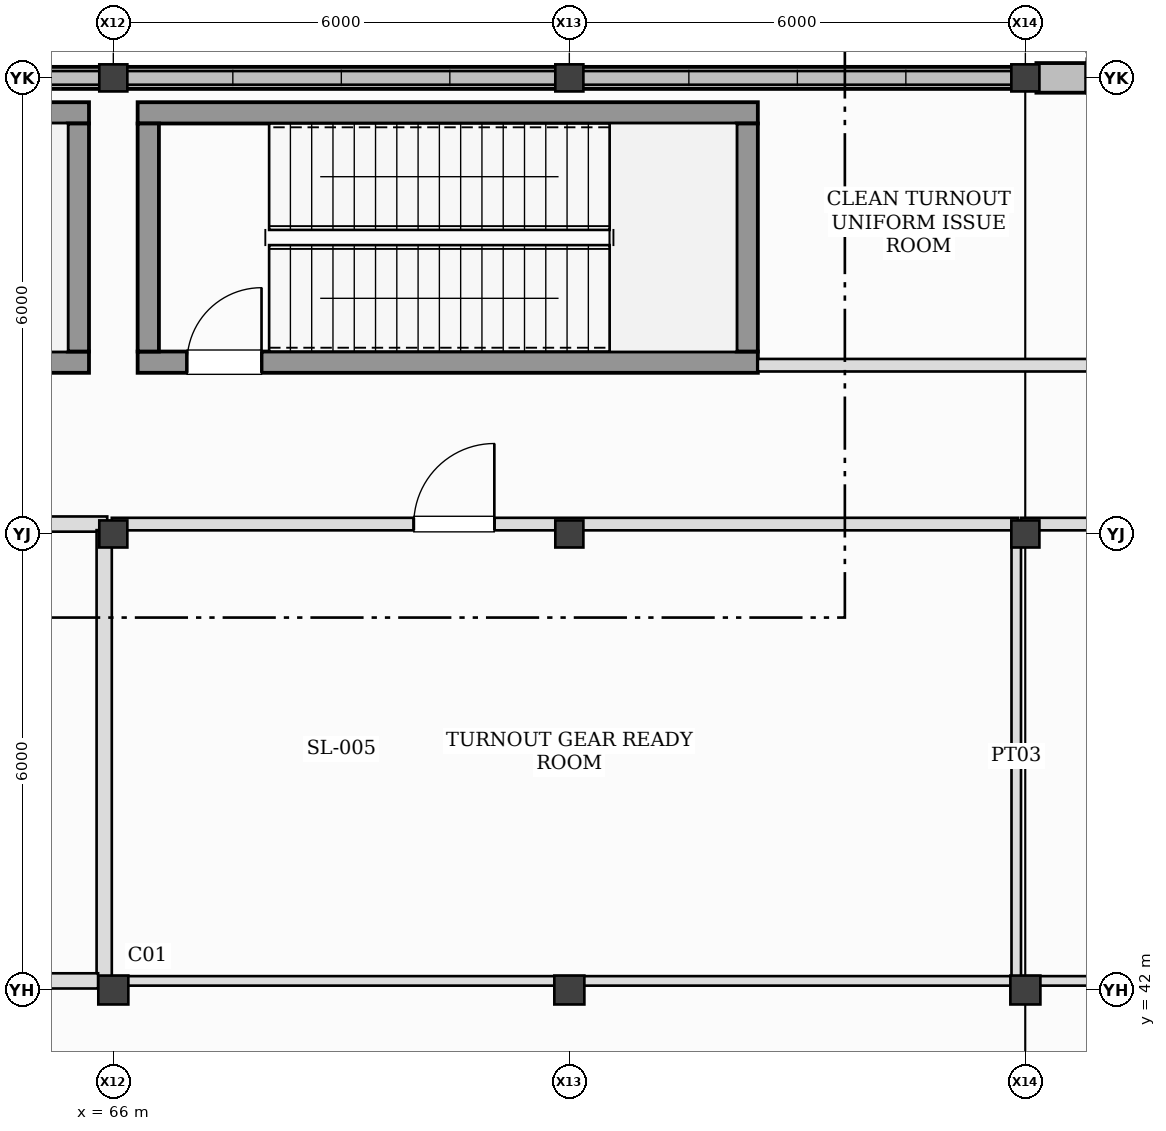
"""IFC4 building model, lengths in metres.
Left out: names, types, materials, properties, quantities, classifications, styles, units other than length and angle.
Written with IfcOpenShell. Run it as: python <this file> out.ifc"""

import sys

from ifc_helpers import new_model, si_unit, direction, frame, frame_2d, origin, origin_2d, place, context, subcontext, project, spatial, rectangle, i_section, extrude, element, fill, save


model = new_model("IFC4")
c1 = context("Model", 3, precision=1e-05, world=origin(), true_north=direction((0.0, 1.0)))
c2 = subcontext(c1, "Body", "Model", "MODEL_VIEW")
j1 = project(units=[si_unit("LENGTHUNIT", "METRE"), si_unit("PLANEANGLEUNIT", "RADIAN")], contexts=[c1])
p1 = place(None, origin())
s1 = spatial("IfcSite", under=j1, at=p1, CompositionType="ELEMENT")
p2 = place(p1, origin())
s2 = spatial("IfcBuilding", under=s1, at=p2, CompositionType="ELEMENT")
p3 = place(p2, origin())
s3 = spatial("IfcBuildingStorey", under=s2, at=p3, CompositionType="ELEMENT", Elevation=0.0)
p4 = place(p3, frame((66.0, 42.0, -0.41), z_axis=(0.0, 0.0, 1.0), x_axis=(1.0, 0.0, 0.0)))
e1 = element("IfcColumn", 1, at=p4, inside=s3, PredefinedType="COLUMN", context=c2, shape_type="SweptSolid", body=[
    extrude(i_section(OverallWidth=0.395, OverallDepth=0.38, WebThickness=0.019, FlangeThickness=0.03, at=origin_2d()), origin(), (0.0, 0.0, 1.0), 6.41),
])
for number, where, z_axis, x_axis in (
    (2, (66.0, 48.0, -0.41), (0.0, 0.0, 1.0), (1.0, 0.0, 0.0)),
    (3, (66.0, 54.0, -0.41), (0.0, 0.0, 1.0), (1.0, 0.0, 0.0)),
):
    element("IfcColumn", number, at=place(p3, frame(where, z_axis=z_axis, x_axis=x_axis)), inside=s3, PredefinedType="COLUMN", context=c2, shape_type="SweptSolid", body=[
        extrude(i_section(OverallWidth=0.369, OverallDepth=0.356, WebThickness=0.011, FlangeThickness=0.018, at=origin_2d()), origin(), (0.0, 0.0, 1.0), 6.41),
    ])
p5 = place(p3, frame((72.0, 42.0, -0.41), z_axis=(0.0, 0.0, 1.0), x_axis=(1.0, 0.0, 0.0)))
e4 = element("IfcColumn", 4, at=p5, inside=s3, PredefinedType="COLUMN", context=c2, shape_type="SweptSolid", body=[
    extrude(i_section(OverallWidth=0.395, OverallDepth=0.38, WebThickness=0.019, FlangeThickness=0.03, at=origin_2d()), origin(), (0.0, 0.0, 1.0), 6.41),
])
for number, where, z_axis, x_axis in (
    (5, (72.0, 48.0, -0.41), (0.0, 0.0, 1.0), (1.0, 0.0, 0.0)),
    (6, (72.0, 54.0, -0.41), (0.0, 0.0, 1.0), (1.0, 0.0, 0.0)),
):
    element("IfcColumn", number, at=place(p3, frame(where, z_axis=z_axis, x_axis=x_axis)), inside=s3, PredefinedType="COLUMN", context=c2, shape_type="SweptSolid", body=[
        extrude(i_section(OverallWidth=0.369, OverallDepth=0.356, WebThickness=0.011, FlangeThickness=0.018, at=origin_2d()), origin(), (0.0, 0.0, 1.0), 6.41),
    ])
p6 = place(p3, frame((78.0, 42.0, -0.41), z_axis=(0.0, 0.0, 1.0), x_axis=(1.0, 0.0, 0.0)))
e7 = element("IfcColumn", 7, at=p6, inside=s3, PredefinedType="COLUMN", context=c2, shape_type="SweptSolid", body=[
    extrude(i_section(OverallWidth=0.395, OverallDepth=0.38, WebThickness=0.019, FlangeThickness=0.03, at=origin_2d()), origin(), (0.0, 0.0, 1.0), 6.41),
])
for number, where, z_axis, x_axis in (
    (8, (78.0, 48.0, -0.41), (0.0, 0.0, 1.0), (1.0, 0.0, 0.0)),
    (9, (78.0, 54.0, -0.41), (0.0, 0.0, 1.0), (1.0, 0.0, 0.0)),
):
    element("IfcColumn", number, at=place(p3, frame(where, z_axis=z_axis, x_axis=x_axis)), inside=s3, PredefinedType="COLUMN", context=c2, shape_type="SweptSolid", body=[
        extrude(i_section(OverallWidth=0.369, OverallDepth=0.356, WebThickness=0.011, FlangeThickness=0.018, at=origin_2d()), origin(), (0.0, 0.0, 1.0), 6.41),
    ])
p7 = place(p3, frame((65.855, 54.0, 0.0), z_axis=(0.0, 0.0, 1.0), x_axis=(-1.0, 0.0, 0.0)))
e10 = element("IfcWall", 10, at=p7, inside=s3, PredefinedType="STANDARD", context=c2, shape_type="SweptSolid", body=[
    extrude(rectangle(XDim=5.71, YDim=0.29, at=frame_2d((2.855, 0.0))), origin(), (0.0, 0.0, 1.0), 0.92),
])
p8 = place(p3, frame((71.855, 54.0, 0.0), z_axis=(0.0, 0.0, 1.0), x_axis=(-1.0, 0.0, 0.0)))
e11 = element("IfcWall", 11, at=p8, inside=s3, PredefinedType="STANDARD", context=c2, shape_type="SweptSolid", body=[
    extrude(rectangle(XDim=5.71, YDim=0.29, at=frame_2d((2.855, 0.0))), origin(), (0.0, 0.0, 1.0), 0.32),
])
p9 = place(p3, frame((77.855, 54.0, 0.0), z_axis=(0.0, 0.0, 1.0), x_axis=(-1.0, 0.0, 0.0)))
e12 = element("IfcWall", 12, at=p9, inside=s3, PredefinedType="STANDARD", context=c2, shape_type="SweptSolid", body=[
    extrude(rectangle(XDim=5.71, YDim=0.29, at=frame_2d((2.855, 0.0))), origin(), (0.0, 0.0, 1.0), 0.44),
])
p10 = place(p3, frame((83.855, 54.0, 0.0), z_axis=(0.0, 0.0, 1.0), x_axis=(-1.0, 0.0, 0.0)))
e13 = element("IfcWall", 13, at=p10, inside=s3, PredefinedType="STANDARD", context=c2, shape_type="SweptSolid", body=[
    extrude(rectangle(XDim=5.71, YDim=0.39, at=frame_2d((2.855, 0.0))), origin(), (0.0, 0.0, 1.0), 5.035),
])
p11 = place(p10, frame((0.655, 0.0, 0.0)))
e14 = element("IfcOpeningElement", 14, at=p11, cuts=e13, PredefinedType="OPENING", context=c2, shape_type="SweptSolid", body=[
    extrude(rectangle(XDim=4.4, YDim=4.55, at=frame_2d((2.2, 2.275))), frame((0.0, 0.205, 0.0), z_axis=(0.0, -1.0, 0.0), x_axis=(1.0, 0.0, 0.0)), (0.0, 0.0, 1.0), 0.41),
])
p12 = place(p3, frame((57.52, 50.26, 0.0), z_axis=(0.0, 0.0, 1.0), x_axis=(1.0, 0.0, 0.0)))
e15 = element("IfcWall", 15, at=p12, inside=s3, PredefinedType="SHEAR", context=c2, shape_type="SweptSolid", body=[
    extrude(rectangle(XDim=8.16, YDim=0.28, at=frame_2d((4.08, 0.0))), origin(), (0.0, 0.0, 1.0), 6.0),
])
p13 = place(p12, frame((0.65, 0.0, 0.0)))
e16 = element("IfcOpeningElement", 16, at=p13, cuts=e15, PredefinedType="OPENING", context=c2, shape_type="SweptSolid", body=[
    extrude(rectangle(XDim=0.98, YDim=2.15, at=frame_2d((0.49, 1.075))), frame((0.0, 0.15, 0.0), z_axis=(0.0, -1.0, 0.0), x_axis=(1.0, 0.0, 0.0)), (0.0, 0.0, 1.0), 0.3),
])
p14 = place(p3, frame((65.68, 53.54, 0.0), z_axis=(0.0, 0.0, 1.0), x_axis=(-1.0, 0.0, 0.0)))
e17 = element("IfcWall", 17, at=p14, inside=s3, PredefinedType="SHEAR", context=c2, shape_type="SweptSolid", body=[
    extrude(rectangle(XDim=8.16, YDim=0.28, at=frame_2d((4.08, 0.0))), origin(), (0.0, 0.0, 1.0), 6.0),
])
p15 = place(p3, frame((65.54, 50.4, 0.0), z_axis=(0.0, 0.0, 1.0), x_axis=(0.0, 1.0, 0.0)))
e18 = element("IfcWall", 18, at=p15, inside=s3, PredefinedType="SHEAR", context=c2, shape_type="SweptSolid", body=[
    extrude(rectangle(XDim=3.0, YDim=0.28, at=frame_2d((1.5, 0.0))), origin(), (0.0, 0.0, 1.0), 6.0),
])
p16 = place(p3, frame((66.32, 50.26, 0.0), z_axis=(0.0, 0.0, 1.0), x_axis=(1.0, 0.0, 0.0)))
e19 = element("IfcWall", 19, at=p16, inside=s3, PredefinedType="SHEAR", context=c2, shape_type="SweptSolid", body=[
    extrude(rectangle(XDim=8.16, YDim=0.28, at=frame_2d((4.08, 0.0))), origin(), (0.0, 0.0, 1.0), 6.0),
])
p17 = place(p16, frame((0.65, 0.0, 0.0)))
e20 = element("IfcOpeningElement", 20, at=p17, cuts=e19, PredefinedType="OPENING", context=c2, shape_type="SweptSolid", body=[
    extrude(rectangle(XDim=0.98, YDim=2.15, at=frame_2d((0.49, 1.075))), frame((0.0, 0.15, 0.0), z_axis=(0.0, -1.0, 0.0), x_axis=(1.0, 0.0, 0.0)), (0.0, 0.0, 1.0), 0.3),
])
p18 = place(p3, frame((74.48, 53.54, 0.0), z_axis=(0.0, 0.0, 1.0), x_axis=(-1.0, 0.0, 0.0)))
e21 = element("IfcWall", 21, at=p18, inside=s3, PredefinedType="SHEAR", context=c2, shape_type="SweptSolid", body=[
    extrude(rectangle(XDim=8.16, YDim=0.28, at=frame_2d((4.08, 0.0))), origin(), (0.0, 0.0, 1.0), 6.0),
])
for number, where, z_axis, x_axis in (
    (22, (66.46, 53.4, 0.0), (0.0, 0.0, 1.0), (0.0, -1.0, 0.0)),
    (23, (74.34, 50.4, 0.0), (0.0, 0.0, 1.0), (0.0, 1.0, 0.0)),
):
    element("IfcWall", number, at=place(p3, frame(where, z_axis=z_axis, x_axis=x_axis)), inside=s3, PredefinedType="SHEAR", context=c2, shape_type="SweptSolid", body=[
        extrude(rectangle(XDim=3.0, YDim=0.28, at=frame_2d((1.5, 0.0))), origin(), (0.0, 0.0, 1.0), 6.0),
    ])
p19 = place(p3, frame((53.98, 48.13, 0.0), z_axis=(0.0, 0.0, 1.0), x_axis=(1.0, 0.0, 0.0)))
e24 = element("IfcWall", 24, at=p19, inside=s3, PredefinedType="PARTITIONING", context=c2, shape_type="SweptSolid", body=[
    extrude(rectangle(XDim=11.94, YDim=0.2, at=frame_2d((5.97, 0.0))), origin(), (0.0, 0.0, 1.0), 5.035),
])
p20 = place(p19, frame((3.915, 0.0, 0.0)))
e25 = element("IfcOpeningElement", 25, at=p20, cuts=e24, PredefinedType="OPENING", context=c2, shape_type="SweptSolid", body=[
    extrude(rectangle(XDim=1.46, YDim=2.3, at=frame_2d((0.73, 1.15))), frame((0.0, 0.11, 0.0), z_axis=(0.0, -1.0, 0.0), x_axis=(1.0, 0.0, 0.0)), (0.0, 0.0, 1.0), 0.22),
])
p21 = place(p3, frame((65.88, 48.05, 0.0), z_axis=(0.0, 0.0, 1.0), x_axis=(0.0, -1.0, 0.0)))
e26 = element("IfcWall", 26, at=p21, inside=s3, PredefinedType="PARTITIONING", context=c2, shape_type="SweptSolid", body=[
    extrude(rectangle(XDim=5.97, YDim=0.2, at=frame_2d((2.985, 0.0))), origin(), (0.0, 0.0, 1.0), 5.044),
])
p22 = place(p3, frame((65.8, 42.12, 0.0), z_axis=(0.0, 0.0, 1.0), x_axis=(-1.0, 0.0, 0.0)))
e27 = element("IfcWall", 27, at=p22, inside=s3, PredefinedType="PARTITIONING", context=c2, shape_type="SweptSolid", body=[
    extrude(rectangle(XDim=11.82, YDim=0.2, at=frame_2d((5.91, 0.0))), origin(), (0.0, 0.0, 1.0), 5.035),
])
p23 = place(p3, frame((65.98, 48.13, 0.0), z_axis=(0.0, 0.0, 1.0), x_axis=(1.0, 0.0, 0.0)))
e28 = element("IfcWall", 28, at=p23, inside=s3, PredefinedType="PARTITIONING", context=c2, shape_type="SweptSolid", body=[
    extrude(rectangle(XDim=11.923, YDim=0.165, at=frame_2d((5.961, 0.0))), origin(), (0.0, 0.0, 1.0), 5.035),
])
p24 = place(p23, frame((3.973, 0.0, 0.0)))
e29 = element("IfcOpeningElement", 29, at=p24, cuts=e28, PredefinedType="OPENING", context=c2, shape_type="SweptSolid", body=[
    extrude(rectangle(XDim=1.06, YDim=2.25, at=frame_2d((0.53, 1.125))), frame((0.0, 0.093, 0.0), z_axis=(0.0, -1.0, 0.0), x_axis=(1.0, 0.0, 0.0)), (0.0, 0.0, 1.0), 0.185),
])
p25 = place(p3, frame((77.88, 48.05, 0.0), z_axis=(0.0, 0.0, 1.0), x_axis=(0.0, -1.0, 0.0)))
e30 = element("IfcWall", 30, at=p25, inside=s3, PredefinedType="PARTITIONING", context=c2, shape_type="SweptSolid", body=[
    extrude(rectangle(XDim=5.933, YDim=0.125, at=frame_2d((2.966, 0.0))), origin(), (0.0, 0.0, 1.0), 5.044),
])
p26 = place(p3, frame((77.817, 42.12, 0.0), z_axis=(0.0, 0.0, 1.0), x_axis=(-1.0, 0.0, 0.0)))
e31 = element("IfcWall", 31, at=p26, inside=s3, PredefinedType="PARTITIONING", context=c2, shape_type="SweptSolid", body=[
    extrude(rectangle(XDim=11.837, YDim=0.125, at=frame_2d((5.919, 0.0))), origin(), (0.0, 0.0, 1.0), 5.035),
])
p27 = place(p3, frame((77.942, 48.13, 0.0), z_axis=(0.0, 0.0, 1.0), x_axis=(1.0, 0.0, 0.0)))
e32 = element("IfcWall", 32, at=p27, inside=s3, PredefinedType="PARTITIONING", context=c2, shape_type="SweptSolid", body=[
    extrude(rectangle(XDim=11.958, YDim=0.165, at=frame_2d((5.979, 0.0))), origin(), (0.0, 0.0, 1.0), 5.035),
])
p28 = place(p27, frame((3.752, 0.0, 0.0)))
e33 = element("IfcOpeningElement", 33, at=p28, cuts=e32, PredefinedType="OPENING", context=c2, shape_type="SweptSolid", body=[
    extrude(rectangle(XDim=1.76, YDim=2.26, at=frame_2d((0.88, 1.13))), frame((0.0, 0.093, 0.0), z_axis=(0.0, -1.0, 0.0), x_axis=(1.0, 0.0, 0.0)), (0.0, 0.0, 1.0), 0.185),
])
p29 = place(p3, frame((89.9, 42.12, 0.0), z_axis=(0.0, 0.0, 1.0), x_axis=(-1.0, 0.0, 0.0)))
e34 = element("IfcWall", 34, at=p29, inside=s3, PredefinedType="PARTITIONING", context=c2, shape_type="SweptSolid", body=[
    extrude(rectangle(XDim=11.958, YDim=0.125, at=frame_2d((5.979, 0.0))), origin(), (0.0, 0.0, 1.0), 5.035),
])
p30 = place(p3, frame((89.9, 50.22, 0.0), z_axis=(0.0, 0.0, 1.0), x_axis=(-1.0, 0.0, 0.0)))
e35 = element("IfcWall", 35, at=p30, inside=s3, PredefinedType="PARTITIONING", context=c2, shape_type="SweptSolid", body=[
    extrude(rectangle(XDim=15.42, YDim=0.165, at=frame_2d((7.71, 0.0))), origin(), (0.0, 0.0, 1.0), 5.68),
])
p31 = place(p30, frame((7.235, 0.0, 0.0)))
e36 = element("IfcOpeningElement", 36, at=p31, cuts=e35, PredefinedType="OPENING", context=c2, shape_type="SweptSolid", body=[
    extrude(rectangle(XDim=0.95, YDim=2.12, at=frame_2d((0.475, 1.06))), frame((0.0, 0.093, 0.0), z_axis=(0.0, -1.0, 0.0), x_axis=(1.0, 0.0, 0.0)), (0.0, 0.0, 1.0), 0.185),
])
p32 = place(p17, origin())
e37 = element("IfcDoor", 37, at=p32, inside=s3, OperationType="SINGLE_SWING_RIGHT", PredefinedType="DOOR", context=c2, shape_type="SweptSolid", body=[
    extrude(rectangle(XDim=0.98, YDim=2.15, at=frame_2d((0.49, 1.075))), frame((0.0, 0.025, 0.0), z_axis=(0.0, -1.0, 0.0), x_axis=(1.0, 0.0, 0.0)), (0.0, 0.0, 1.0), 0.05),
])
fill(e20, e37)
p33 = place(p24, frame((1.06, 0.0, 0.0), z_axis=(0.0, 0.0, 1.0), x_axis=(-1.0, 0.0, 0.0)))
e38 = element("IfcDoor", 38, at=p33, inside=s3, OperationType="SINGLE_SWING_RIGHT", PredefinedType="DOOR", context=c2, shape_type="SweptSolid", body=[
    extrude(rectangle(XDim=1.06, YDim=2.25, at=frame_2d((0.53, 1.125))), frame((0.0, 0.025, 0.0), z_axis=(0.0, -1.0, 0.0), x_axis=(1.0, 0.0, 0.0)), (0.0, 0.0, 1.0), 0.05),
])
fill(e29, e38)
save(model, sys.argv[1])
